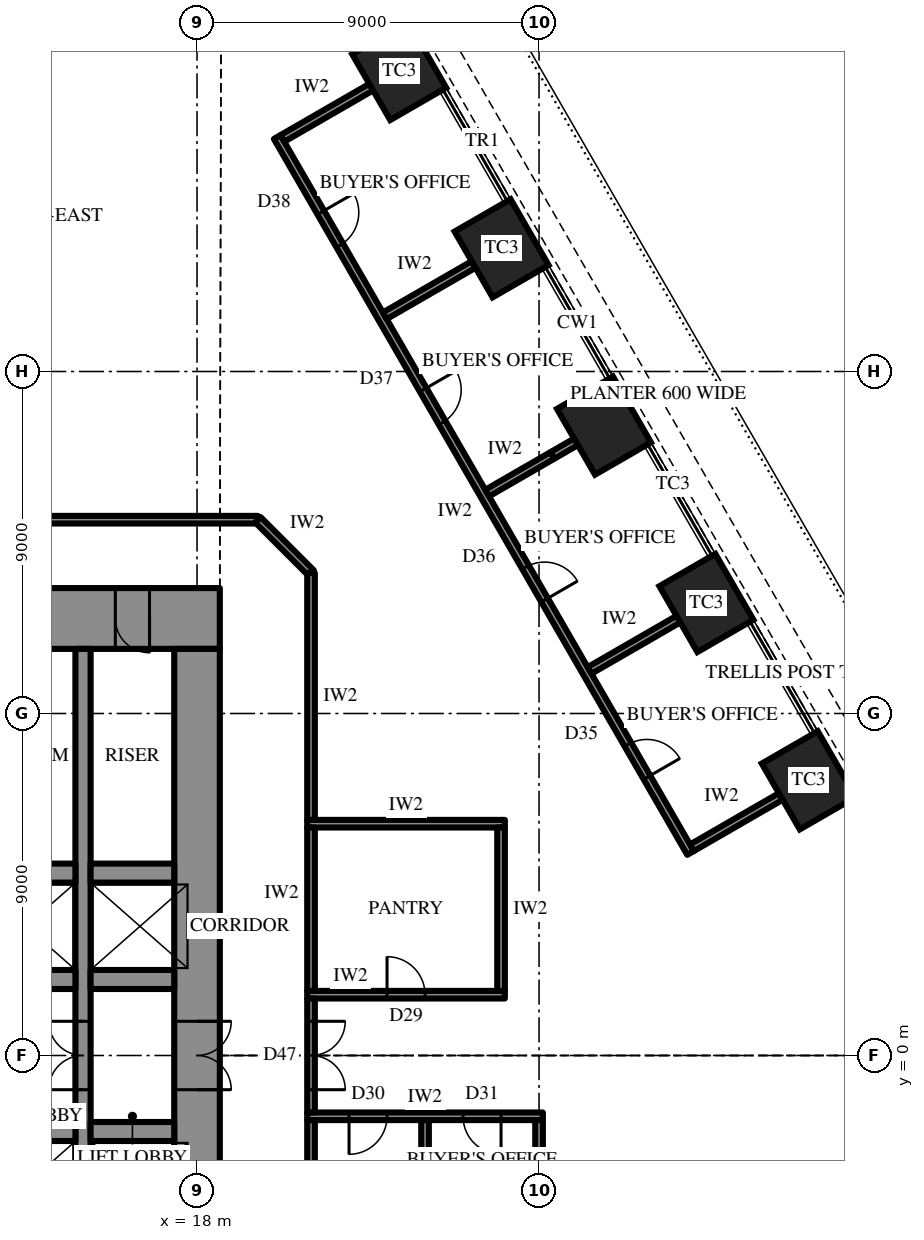
"""IFC4 building model, lengths in metres.
Left out: names, types, materials, properties, quantities, classifications, styles, units other than length and angle.
Written with IfcOpenShell. Run it as: python <this file> out.ifc"""

import sys

from ifc_helpers import new_model, si_unit, direction, frame, frame_2d, origin, origin_2d, place, context, subcontext, project, spatial, rectangle, extrude, element, fill, save


model = new_model("IFC4")
c1 = context("Model", 3, precision=1e-05, world=origin(), true_north=direction((0.0, 1.0)))
c2 = subcontext(c1, "Body", "Model", "MODEL_VIEW")
j1 = project(units=[si_unit("LENGTHUNIT", "METRE"), si_unit("PLANEANGLEUNIT", "RADIAN")], contexts=[c1])
p1 = place(None, origin())
s1 = spatial("IfcSite", under=j1, at=p1, CompositionType="ELEMENT")
p2 = place(p1, origin())
s2 = spatial("IfcBuilding", under=s1, at=p2, CompositionType="ELEMENT")
p3 = place(p2, frame((0.0, 0.0, 65.5)))
s3 = spatial("IfcBuildingStorey", under=s2, at=p3, CompositionType="ELEMENT", Elevation=65.5)
for number, where, z_axis, x_axis in (
    (1, (34.097, 7.242, 0.0), (0.0, 0.0, 1.0), (-0.5, 0.866, 0.0)),
    (2, (31.403, 11.908, 0.0), (0.0, 0.0, 1.0), (-0.5, 0.866, 0.0)),
    (3, (28.709, 16.575, 0.0), (0.0, 0.0, 1.0), (-0.5, 0.866, 0.0)),
    (4, (26.014, 21.242, 0.0), (0.0, 0.0, 1.0), (-0.5, 0.866, 0.0)),
    (5, (23.32, 25.908, 0.0), (0.0, 0.0, 1.0), (-0.5, 0.866, 0.0)),
):
    element("IfcColumn", number, at=place(p3, frame(where, z_axis=z_axis, x_axis=x_axis)), inside=s3, PredefinedType="COLUMN", context=c2, shape_type="SweptSolid", body=[
        extrude(rectangle(XDim=2.0, YDim=1.7, at=origin_2d()), origin(), (0.0, 0.0, 1.0), 4.2),
    ])
p4 = place(p3, frame((-18.6, 11.5, 0.0), z_axis=(0.0, 0.0, 1.0), x_axis=(1.0, 0.0, 0.0)))
e6 = element("IfcWall", 6, at=p4, inside=s3, PredefinedType="SHEAR", context=c2, shape_type="SweptSolid", body=[
    extrude(rectangle(XDim=37.2, YDim=1.6, at=frame_2d((18.6, 0.0))), origin(), (0.0, 0.0, 1.0), 4.2),
])
p5 = place(p4, frame((19.45, 0.0, 0.0)))
e7 = element("IfcOpeningElement", 7, at=p5, cuts=e6, PredefinedType="OPENING", context=c2, shape_type="SweptSolid", body=[
    extrude(rectangle(XDim=0.9, YDim=2.2, at=frame_2d((0.45, 1.1))), frame((0.0, 0.81, 0.0), z_axis=(0.0, -1.0, 0.0), x_axis=(1.0, 0.0, 0.0)), (0.0, 0.0, 1.0), 1.62),
])
p6 = place(p4, frame((22.45, 0.0, 0.0)))
e8 = element("IfcOpeningElement", 8, at=p6, cuts=e6, PredefinedType="OPENING", context=c2, shape_type="SweptSolid", body=[
    extrude(rectangle(XDim=0.9, YDim=2.2, at=frame_2d((0.45, 1.1))), frame((0.0, 0.81, 0.0), z_axis=(0.0, -1.0, 0.0), x_axis=(1.0, 0.0, 0.0)), (0.0, 0.0, 1.0), 1.62),
])
p7 = place(p4, frame((25.5, 0.0, 0.0)))
e9 = element("IfcOpeningElement", 9, at=p7, cuts=e6, PredefinedType="OPENING", context=c2, shape_type="SweptSolid", body=[
    extrude(rectangle(XDim=1.0, YDim=2.2, at=frame_2d((0.5, 1.1))), frame((0.0, 0.81, 0.0), z_axis=(0.0, -1.0, 0.0), x_axis=(1.0, 0.0, 0.0)), (0.0, 0.0, 1.0), 1.62),
])
p8 = place(p4, frame((1.85, 0.0, 0.0)))
e10 = element("IfcOpeningElement", 10, at=p8, cuts=e6, PredefinedType="OPENING", context=c2, shape_type="SweptSolid", body=[
    extrude(rectangle(XDim=0.9, YDim=2.2, at=frame_2d((0.45, 1.1))), frame((0.0, 0.81, 0.0), z_axis=(0.0, -1.0, 0.0), x_axis=(1.0, 0.0, 0.0)), (0.0, 0.0, 1.0), 1.62),
])
p9 = place(p4, frame((4.6, 0.0, 0.0)))
e11 = element("IfcOpeningElement", 11, at=p9, cuts=e6, PredefinedType="OPENING", context=c2, shape_type="SweptSolid", body=[
    extrude(rectangle(XDim=0.9, YDim=2.2, at=frame_2d((0.45, 1.1))), frame((0.0, 0.81, 0.0), z_axis=(0.0, -1.0, 0.0), x_axis=(1.0, 0.0, 0.0)), (0.0, 0.0, 1.0), 1.62),
])
p10 = place(p4, frame((7.75, 0.0, 0.0)))
e12 = element("IfcOpeningElement", 12, at=p10, cuts=e6, PredefinedType="OPENING", context=c2, shape_type="SweptSolid", body=[
    extrude(rectangle(XDim=0.9, YDim=2.2, at=frame_2d((0.45, 1.1))), frame((0.0, 0.81, 0.0), z_axis=(0.0, -1.0, 0.0), x_axis=(1.0, 0.0, 0.0)), (0.0, 0.0, 1.0), 1.62),
])
p11 = place(p4, frame((28.55, 0.0, 0.0)))
e13 = element("IfcOpeningElement", 13, at=p11, cuts=e6, PredefinedType="OPENING", context=c2, shape_type="SweptSolid", body=[
    extrude(rectangle(XDim=0.9, YDim=2.2, at=frame_2d((0.45, 1.1))), frame((0.0, 0.81, 0.0), z_axis=(0.0, -1.0, 0.0), x_axis=(1.0, 0.0, 0.0)), (0.0, 0.0, 1.0), 1.62),
])
p12 = place(p4, frame((31.7, 0.0, 0.0)))
e14 = element("IfcOpeningElement", 14, at=p12, cuts=e6, PredefinedType="OPENING", context=c2, shape_type="SweptSolid", body=[
    extrude(rectangle(XDim=0.9, YDim=2.2, at=frame_2d((0.45, 1.1))), frame((0.0, 0.81, 0.0), z_axis=(0.0, -1.0, 0.0), x_axis=(1.0, 0.0, 0.0)), (0.0, 0.0, 1.0), 1.62),
])
p13 = place(p4, frame((34.45, 0.0, 0.0)))
e15 = element("IfcOpeningElement", 15, at=p13, cuts=e6, PredefinedType="OPENING", context=c2, shape_type="SweptSolid", body=[
    extrude(rectangle(XDim=0.9, YDim=2.2, at=frame_2d((0.45, 1.1))), frame((0.0, 0.81, 0.0), z_axis=(0.0, -1.0, 0.0), x_axis=(1.0, 0.0, 0.0)), (0.0, 0.0, 1.0), 1.62),
])
p14 = place(p3, frame((18.0, -10.7, 0.0), z_axis=(0.0, 0.0, 1.0), x_axis=(0.0, 1.0, 0.0)))
e16 = element("IfcWall", 16, at=p14, inside=s3, PredefinedType="SHEAR", context=c2, shape_type="SweptSolid", body=[
    extrude(rectangle(XDim=21.4, YDim=1.2, at=frame_2d((10.7, 0.0))), origin(), (0.0, 0.0, 1.0), 4.2),
])
p15 = place(p14, frame((9.8, 0.0, 0.0)))
e17 = element("IfcOpeningElement", 17, at=p15, cuts=e16, PredefinedType="OPENING", context=c2, shape_type="SweptSolid", body=[
    extrude(rectangle(XDim=1.8, YDim=2.4, at=frame_2d((0.9, 1.2))), frame((0.0, 0.61, 0.0), z_axis=(0.0, -1.0, 0.0), x_axis=(1.0, 0.0, 0.0)), (0.0, 0.0, 1.0), 1.22),
])
p16 = place(p3, frame((15.0, -10.7, 0.0), z_axis=(0.0, 0.0, 1.0), x_axis=(0.0, 1.0, 0.0)))
e18 = element("IfcWall", 18, at=p16, inside=s3, PredefinedType="SHEAR", context=c2, shape_type="SweptSolid", body=[
    extrude(rectangle(XDim=21.4, YDim=0.4, at=frame_2d((10.7, 0.0))), origin(), (0.0, 0.0, 1.0), 4.2),
])
p17 = place(p16, frame((9.8, 0.0, 0.0)))
e19 = element("IfcOpeningElement", 19, at=p17, cuts=e18, PredefinedType="OPENING", context=c2, shape_type="SweptSolid", body=[
    extrude(rectangle(XDim=1.8, YDim=2.4, at=frame_2d((0.9, 1.2))), frame((0.0, 0.21, 0.0), z_axis=(0.0, -1.0, 0.0), x_axis=(1.0, 0.0, 0.0)), (0.0, 0.0, 1.0), 0.42),
])
p18 = place(p3, frame((12.3, 2.0, 0.0), z_axis=(0.0, 0.0, 1.0), x_axis=(1.0, 0.0, 0.0)))
e20 = element("IfcWall", 20, at=p18, inside=s3, PredefinedType="SHEAR", context=c2, shape_type="SweptSolid", body=[
    extrude(rectangle(XDim=2.5, YDim=0.5, at=frame_2d((1.25, 0.0))), origin(), (0.0, 0.0, 1.0), 4.2),
])
p19 = place(p3, frame((15.2, 2.0, 0.0), z_axis=(0.0, 0.0, 1.0), x_axis=(1.0, 0.0, 0.0)))
e21 = element("IfcWall", 21, at=p19, inside=s3, PredefinedType="SHEAR", context=c2, shape_type="SweptSolid", body=[
    extrude(rectangle(XDim=2.2, YDim=0.5, at=frame_2d((1.1, 0.0))), origin(), (0.0, 0.0, 1.0), 4.2),
])
p20 = place(p3, frame((12.3, 4.8, 0.0), z_axis=(0.0, 0.0, 1.0), x_axis=(1.0, 0.0, 0.0)))
e22 = element("IfcWall", 22, at=p20, inside=s3, PredefinedType="SHEAR", context=c2, shape_type="SweptSolid", body=[
    extrude(rectangle(XDim=2.5, YDim=0.5, at=frame_2d((1.25, 0.0))), origin(), (0.0, 0.0, 1.0), 4.2),
])
for number, where, z_axis, x_axis in (
    (23, (15.2, 4.8, 0.0), (0.0, 0.0, 1.0), (1.0, 0.0, 0.0)),
    (24, (17.4, -2.0, 0.0), (0.0, 0.0, 1.0), (-1.0, 0.0, 0.0)),
):
    element("IfcWall", number, at=place(p3, frame(where, z_axis=z_axis, x_axis=x_axis)), inside=s3, PredefinedType="SHEAR", context=c2, shape_type="SweptSolid", body=[
        extrude(rectangle(XDim=2.2, YDim=0.5, at=frame_2d((1.1, 0.0))), origin(), (0.0, 0.0, 1.0), 4.2),
    ])
p21 = place(p3, frame((14.8, -2.0, 0.0), z_axis=(0.0, 0.0, 1.0), x_axis=(-1.0, 0.0, 0.0)))
e25 = element("IfcWall", 25, at=p21, inside=s3, PredefinedType="SHEAR", context=c2, shape_type="SweptSolid", body=[
    extrude(rectangle(XDim=2.5, YDim=0.5, at=frame_2d((1.25, 0.0))), origin(), (0.0, 0.0, 1.0), 4.2),
])
p22 = place(p3, frame((30.986, 5.33, 0.0), z_axis=(0.0, 0.0, 1.0), x_axis=(-0.500000289772, 0.866025236485, 0.0)))
e26 = element("IfcWall", 26, at=p22, inside=s3, PredefinedType="PARTITIONING", context=c2, shape_type="SweptSolid", body=[
    extrude(rectangle(XDim=21.754, YDim=0.2, at=frame_2d((10.877, 0.0))), origin(), (0.0, 0.0, 1.0), 4.0),
])
p23 = place(p22, frame((2.294, 0.0, 0.0)))
e27 = element("IfcOpeningElement", 27, at=p23, cuts=e26, PredefinedType="OPENING", context=c2, shape_type="SweptSolid", body=[
    extrude(rectangle(XDim=1.0, YDim=2.2, at=frame_2d((0.5, 1.1))), frame((0.0, 0.11, 0.0), z_axis=(0.0, -1.0, 0.0), x_axis=(1.0, 0.0, 0.0)), (0.0, 0.0, 1.0), 0.22),
])
p24 = place(p22, frame((7.683, 0.0, 0.0)))
e28 = element("IfcOpeningElement", 28, at=p24, cuts=e26, PredefinedType="OPENING", context=c2, shape_type="SweptSolid", body=[
    extrude(rectangle(XDim=1.0, YDim=2.2, at=frame_2d((0.5, 1.1))), frame((0.0, 0.11, 0.0), z_axis=(0.0, -1.0, 0.0), x_axis=(1.0, 0.0, 0.0)), (0.0, 0.0, 1.0), 0.22),
])
p25 = place(p22, frame((13.072, 0.0, 0.0)))
e29 = element("IfcOpeningElement", 29, at=p25, cuts=e26, PredefinedType="OPENING", context=c2, shape_type="SweptSolid", body=[
    extrude(rectangle(XDim=1.0, YDim=2.2, at=frame_2d((0.5, 1.1))), frame((0.0, 0.11, 0.0), z_axis=(0.0, -1.0, 0.0), x_axis=(1.0, 0.0, 0.0)), (0.0, 0.0, 1.0), 0.22),
])
p26 = place(p22, frame((18.46, 0.0, 0.0)))
e30 = element("IfcOpeningElement", 30, at=p26, cuts=e26, PredefinedType="OPENING", context=c2, shape_type="SweptSolid", body=[
    extrude(rectangle(XDim=1.0, YDim=2.2, at=frame_2d((0.5, 1.1))), frame((0.0, 0.11, 0.0), z_axis=(0.0, -1.0, 0.0), x_axis=(1.0, 0.0, 0.0)), (0.0, 0.0, 1.0), 0.22),
])
for number, where, z_axis, x_axis in (
    (31, (31.023, 5.467, 0.0), (0.0, 0.0, 1.0), (0.866, 0.5, 0.0)),
    (32, (28.329, 10.133, 0.0), (0.0, 0.0, 1.0), (0.866, 0.5, 0.0)),
):
    element("IfcWall", number, at=place(p3, frame(where, z_axis=z_axis, x_axis=x_axis)), inside=s3, PredefinedType="PARTITIONING", context=c2, shape_type="SweptSolid", body=[
        extrude(rectangle(XDim=2.7, YDim=0.2, at=frame_2d((1.35, 0.0))), origin(), (0.0, 0.0, 1.0), 2.944),
    ])
p27 = place(p3, frame((25.634, 14.8, 0.0), z_axis=(0.0, 0.0, 1.0), x_axis=(0.866038008192, 0.49997816789, 0.0)))
e33 = element("IfcWall", 33, at=p27, inside=s3, PredefinedType="PARTITIONING", context=c2, shape_type="SweptSolid", body=[
    extrude(rectangle(XDim=1.983, YDim=0.2, at=frame_2d((0.992, 0.0))), origin(), (0.0, 0.0, 1.0), 4.0),
])
p28 = place(p3, frame((27.352, 15.792, 0.0), z_axis=(0.0, 0.0, 1.0), x_axis=(0.866117509073, 0.499840435016, 0.0)))
e34 = element("IfcWall", 34, at=p28, inside=s3, PredefinedType="PARTITIONING", context=c2, shape_type="SweptSolid", body=[
    extrude(rectangle(XDim=0.717, YDim=0.2, at=frame_2d((0.358, 0.0))), origin(), (0.0, 0.0, 1.0), 2.992),
])
p29 = place(p3, frame((22.94, 19.467, 0.0), z_axis=(0.0, 0.0, 1.0), x_axis=(0.866019956843, 0.50000943426, 0.0)))
e35 = element("IfcWall", 35, at=p29, inside=s3, PredefinedType="PARTITIONING", context=c2, shape_type="SweptSolid", body=[
    extrude(rectangle(XDim=2.7, YDim=0.2, at=frame_2d((1.35, 0.0))), origin(), (0.0, 0.0, 1.0), 2.992),
])
p30 = place(p3, frame((20.246, 24.133, 0.0), z_axis=(0.0, 0.0, 1.0), x_axis=(0.86599734893, 0.500048589285, 0.0)))
e36 = element("IfcWall", 36, at=p30, inside=s3, PredefinedType="PARTITIONING", context=c2, shape_type="SweptSolid", body=[
    extrude(rectangle(XDim=2.7, YDim=0.2, at=frame_2d((1.35, 0.0))), origin(), (0.0, 0.0, 1.0), 2.992),
])
p31 = place(p3, frame((20.9, 1.6, 0.0), z_axis=(0.0, 0.0, 1.0), x_axis=(1.0, 0.0, 0.0)))
e37 = element("IfcWall", 37, at=p31, inside=s3, PredefinedType="PARTITIONING", context=c2, shape_type="SweptSolid", body=[
    extrude(rectangle(XDim=5.2, YDim=0.2, at=frame_2d((2.6, 0.0))), origin(), (0.0, 0.0, 1.0), 4.0),
])
p32 = place(p31, frame((2.1, 0.0, 0.0)))
e38 = element("IfcOpeningElement", 38, at=p32, cuts=e37, PredefinedType="OPENING", context=c2, shape_type="SweptSolid", body=[
    extrude(rectangle(XDim=1.0, YDim=2.2, at=frame_2d((0.5, 1.1))), frame((0.0, 0.11, 0.0), z_axis=(0.0, -1.0, 0.0), x_axis=(1.0, 0.0, 0.0)), (0.0, 0.0, 1.0), 0.22),
])
p33 = place(p3, frame((20.9, 6.1, 0.0), z_axis=(0.0, 0.0, 1.0), x_axis=(1.0, 0.0, 0.0)))
e39 = element("IfcWall", 39, at=p33, inside=s3, PredefinedType="PARTITIONING", context=c2, shape_type="SweptSolid", body=[
    extrude(rectangle(XDim=5.2, YDim=0.2, at=frame_2d((2.6, 0.0))), origin(), (0.0, 0.0, 1.0), 4.0),
])
for number, where, z_axis, x_axis in (
    (40, (21.0, 1.7, 0.0), (0.0, 0.0, 1.0), (0.0, 1.0, 0.0)),
    (41, (26.0, 1.7, 0.0), (0.0, 0.0, 1.0), (0.0, 1.0, 0.0)),
):
    element("IfcWall", number, at=place(p3, frame(where, z_axis=z_axis, x_axis=x_axis)), inside=s3, PredefinedType="PARTITIONING", context=c2, shape_type="SweptSolid", body=[
        extrude(rectangle(XDim=4.3, YDim=0.2, at=frame_2d((2.15, 0.0))), origin(), (0.0, 0.0, 1.0), 4.0),
    ])
p34 = place(p3, frame((20.9, -1.6, 0.0), z_axis=(0.0, 0.0, 1.0), x_axis=(1.0, 0.0, 0.0)))
e42 = element("IfcWall", 42, at=p34, inside=s3, PredefinedType="PARTITIONING", context=c2, shape_type="SweptSolid", body=[
    extrude(rectangle(XDim=6.2, YDim=0.2, at=frame_2d((3.1, 0.0))), origin(), (0.0, 0.0, 1.0), 4.0),
])
p35 = place(p34, frame((1.1, 0.0, 0.0)))
e43 = element("IfcOpeningElement", 43, at=p35, cuts=e42, PredefinedType="OPENING", context=c2, shape_type="SweptSolid", body=[
    extrude(rectangle(XDim=1.0, YDim=2.2, at=frame_2d((0.5, 1.1))), frame((0.0, 0.11, 0.0), z_axis=(0.0, -1.0, 0.0), x_axis=(1.0, 0.0, 0.0)), (0.0, 0.0, 1.0), 0.22),
])
p36 = place(p34, frame((4.1, 0.0, 0.0)))
e44 = element("IfcOpeningElement", 44, at=p36, cuts=e42, PredefinedType="OPENING", context=c2, shape_type="SweptSolid", body=[
    extrude(rectangle(XDim=1.0, YDim=2.2, at=frame_2d((0.5, 1.1))), frame((0.0, 0.11, 0.0), z_axis=(0.0, -1.0, 0.0), x_axis=(1.0, 0.0, 0.0)), (0.0, 0.0, 1.0), 0.22),
])
for number, where, z_axis, x_axis in (
    (45, (21.0, -1.7, 0.0), (0.0, 0.0, 1.0), (0.0, -1.0, 0.0)),
    (46, (24.0, -1.7, 0.0), (0.0, 0.0, 1.0), (0.0, -1.0, 0.0)),
    (47, (27.0, -1.7, 0.0), (0.0, 0.0, 1.0), (0.0, -1.0, 0.0)),
):
    element("IfcWall", number, at=place(p3, frame(where, z_axis=z_axis, x_axis=x_axis)), inside=s3, PredefinedType="PARTITIONING", context=c2, shape_type="SweptSolid", body=[
        extrude(rectangle(XDim=4.3, YDim=0.2, at=frame_2d((2.15, 0.0))), origin(), (0.0, 0.0, 1.0), 4.0),
    ])
p37 = place(p3, frame((-19.6, 14.1, 0.0), z_axis=(0.0, 0.0, 1.0), x_axis=(1.0, 0.0, 0.0)))
e48 = element("IfcWall", 48, at=p37, inside=s3, PredefinedType="PARTITIONING", context=c2, shape_type="SweptSolid", body=[
    extrude(rectangle(XDim=39.2, YDim=0.2, at=frame_2d((19.6, 0.0))), origin(), (0.0, 0.0, 1.0), 4.0),
])
p38 = place(p37, frame((19.1, 0.0, 0.0)))
e49 = element("IfcOpeningElement", 49, at=p38, cuts=e48, PredefinedType="OPENING", context=c2, shape_type="SweptSolid", body=[
    extrude(rectangle(XDim=1.0, YDim=2.2, at=frame_2d((0.5, 1.1))), frame((0.0, 0.11, 0.0), z_axis=(0.0, -1.0, 0.0), x_axis=(1.0, 0.0, 0.0)), (0.0, 0.0, 1.0), 0.22),
])
p39 = place(p3, frame((19.6, 14.1, 0.0), z_axis=(0.0, 0.0, 1.0), x_axis=(0.707045124756, -0.707168432242, 0.0)))
e50 = element("IfcWall", 50, at=p39, inside=s3, PredefinedType="PARTITIONING", context=c2, shape_type="SweptSolid", body=[
    extrude(rectangle(XDim=1.98, YDim=0.2, at=frame_2d((0.99, 0.0))), origin(), (0.0, 0.0, 1.0), 4.0),
])
p40 = place(p3, frame((21.0, 1.499, 0.0), z_axis=(0.0, 0.0, 1.0), x_axis=(0.0, -1.0, 0.0)))
e51 = element("IfcWall", 51, at=p40, inside=s3, PredefinedType="PARTITIONING", context=c2, shape_type="SweptSolid", body=[
    extrude(rectangle(XDim=2.998, YDim=0.2, at=frame_2d((1.499, 0.0))), origin(), (0.0, 0.0, 1.0), 4.0),
])
p41 = place(p40, frame((0.599, 0.0, 0.0)))
e52 = element("IfcOpeningElement", 52, at=p41, cuts=e51, PredefinedType="OPENING", context=c2, shape_type="SweptSolid", body=[
    extrude(rectangle(XDim=1.8, YDim=2.4, at=frame_2d((0.9, 1.2))), frame((0.0, 0.11, 0.0), z_axis=(0.0, -1.0, 0.0), x_axis=(1.0, 0.0, 0.0)), (0.0, 0.0, 1.0), 0.22),
])
p42 = place(p3, frame((21.0, 12.7, 0.0), z_axis=(0.0, 0.0, 1.0), x_axis=(0.0, -1.0, 0.0)))
e53 = element("IfcWall", 53, at=p42, inside=s3, PredefinedType="PARTITIONING", context=c2, shape_type="SweptSolid", body=[
    extrude(rectangle(XDim=6.499, YDim=0.2, at=frame_2d((3.25, 0.0))), origin(), (0.0, 0.0, 1.0), 4.0),
])
p43 = place(p15, frame((1.8, 0.0, 0.0), z_axis=(0.0, 0.0, 1.0), x_axis=(-1.0, 0.0, 0.0)))
e54 = element("IfcDoor", 54, at=p43, inside=s3, OperationType="DOUBLE_DOOR_SINGLE_SWING", PredefinedType="DOOR", context=c2, shape_type="SweptSolid", body=[
    extrude(rectangle(XDim=1.8, YDim=2.4, at=frame_2d((0.9, 1.2))), frame((0.0, 0.025, 0.0), z_axis=(0.0, -1.0, 0.0), x_axis=(1.0, 0.0, 0.0)), (0.0, 0.0, 1.0), 0.05),
])
fill(e17, e54)
p44 = place(p13, frame((0.9, 0.0, 0.0), z_axis=(0.0, 0.0, 1.0), x_axis=(-1.0, 0.0, 0.0)))
e55 = element("IfcDoor", 55, at=p44, inside=s3, OperationType="SINGLE_SWING_RIGHT", PredefinedType="DOOR", context=c2, shape_type="SweptSolid", body=[
    extrude(rectangle(XDim=0.9, YDim=2.2, at=frame_2d((0.45, 1.1))), frame((0.0, 0.025, 0.0), z_axis=(0.0, -1.0, 0.0), x_axis=(1.0, 0.0, 0.0)), (0.0, 0.0, 1.0), 0.05),
])
fill(e15, e55)
p45 = place(p17, origin())
e56 = element("IfcDoor", 56, at=p45, inside=s3, OperationType="DOUBLE_DOOR_SINGLE_SWING", PredefinedType="DOOR", context=c2, shape_type="SweptSolid", body=[
    extrude(rectangle(XDim=1.8, YDim=2.4, at=frame_2d((0.9, 1.2))), frame((0.0, 0.025, 0.0), z_axis=(0.0, -1.0, 0.0), x_axis=(1.0, 0.0, 0.0)), (0.0, 0.0, 1.0), 0.05),
])
fill(e19, e56)
p46 = place(p23, frame((1.0, 0.0, 0.0), z_axis=(0.0, 0.0, 1.0), x_axis=(-1.0, 0.0, 0.0)))
e57 = element("IfcDoor", 57, at=p46, inside=s3, OperationType="SINGLE_SWING_LEFT", PredefinedType="DOOR", context=c2, shape_type="SweptSolid", body=[
    extrude(rectangle(XDim=1.0, YDim=2.2, at=frame_2d((0.5, 1.1))), frame((0.0, 0.025, 0.0), z_axis=(0.0, -1.0, 0.0), x_axis=(1.0, 0.0, 0.0)), (0.0, 0.0, 1.0), 0.05),
])
fill(e27, e57)
p47 = place(p24, frame((1.0, 0.0, 0.0), z_axis=(0.0, 0.0, 1.0), x_axis=(-1.0, 0.0, 0.0)))
e58 = element("IfcDoor", 58, at=p47, inside=s3, OperationType="SINGLE_SWING_LEFT", PredefinedType="DOOR", context=c2, shape_type="SweptSolid", body=[
    extrude(rectangle(XDim=1.0, YDim=2.2, at=frame_2d((0.5, 1.1))), frame((0.0, 0.025, 0.0), z_axis=(0.0, -1.0, 0.0), x_axis=(1.0, 0.0, 0.0)), (0.0, 0.0, 1.0), 0.05),
])
fill(e28, e58)
p48 = place(p25, frame((1.0, 0.0, 0.0), z_axis=(0.0, 0.0, 1.0), x_axis=(-1.0, 0.0, 0.0)))
e59 = element("IfcDoor", 59, at=p48, inside=s3, OperationType="SINGLE_SWING_RIGHT", PredefinedType="DOOR", context=c2, shape_type="SweptSolid", body=[
    extrude(rectangle(XDim=1.0, YDim=2.2, at=frame_2d((0.5, 1.1))), frame((0.0, 0.025, 0.0), z_axis=(0.0, -1.0, 0.0), x_axis=(1.0, 0.0, 0.0)), (0.0, 0.0, 1.0), 0.05),
])
fill(e29, e59)
p49 = place(p26, frame((1.0, 0.0, 0.0), z_axis=(0.0, 0.0, 1.0), x_axis=(-1.0, 0.0, 0.0)))
e60 = element("IfcDoor", 60, at=p49, inside=s3, OperationType="SINGLE_SWING_RIGHT", PredefinedType="DOOR", context=c2, shape_type="SweptSolid", body=[
    extrude(rectangle(XDim=1.0, YDim=2.2, at=frame_2d((0.5, 1.1))), frame((0.0, 0.025, 0.0), z_axis=(0.0, -1.0, 0.0), x_axis=(1.0, 0.0, 0.0)), (0.0, 0.0, 1.0), 0.05),
])
fill(e30, e60)
p50 = place(p32, origin())
e61 = element("IfcDoor", 61, at=p50, inside=s3, OperationType="SINGLE_SWING_RIGHT", PredefinedType="DOOR", context=c2, shape_type="SweptSolid", body=[
    extrude(rectangle(XDim=1.0, YDim=2.2, at=frame_2d((0.5, 1.1))), frame((0.0, 0.025, 0.0), z_axis=(0.0, -1.0, 0.0), x_axis=(1.0, 0.0, 0.0)), (0.0, 0.0, 1.0), 0.05),
])
fill(e38, e61)
p51 = place(p35, frame((1.0, 0.0, 0.0), z_axis=(0.0, 0.0, 1.0), x_axis=(-1.0, 0.0, 0.0)))
e62 = element("IfcDoor", 62, at=p51, inside=s3, OperationType="SINGLE_SWING_LEFT", PredefinedType="DOOR", context=c2, shape_type="SweptSolid", body=[
    extrude(rectangle(XDim=1.0, YDim=2.2, at=frame_2d((0.5, 1.1))), frame((0.0, 0.025, 0.0), z_axis=(0.0, -1.0, 0.0), x_axis=(1.0, 0.0, 0.0)), (0.0, 0.0, 1.0), 0.05),
])
fill(e43, e62)
p52 = place(p36, frame((1.0, 0.0, 0.0), z_axis=(0.0, 0.0, 1.0), x_axis=(-1.0, 0.0, 0.0)))
e63 = element("IfcDoor", 63, at=p52, inside=s3, OperationType="SINGLE_SWING_RIGHT", PredefinedType="DOOR", context=c2, shape_type="SweptSolid", body=[
    extrude(rectangle(XDim=1.0, YDim=2.2, at=frame_2d((0.5, 1.1))), frame((0.0, 0.025, 0.0), z_axis=(0.0, -1.0, 0.0), x_axis=(1.0, 0.0, 0.0)), (0.0, 0.0, 1.0), 0.05),
])
fill(e44, e63)
p53 = place(p41, origin())
e64 = element("IfcDoor", 64, at=p53, inside=s3, OperationType="DOUBLE_DOOR_SINGLE_SWING", PredefinedType="DOOR", context=c2, shape_type="SweptSolid", body=[
    extrude(rectangle(XDim=1.8, YDim=2.4, at=frame_2d((0.9, 1.2))), frame((0.0, 0.025, 0.0), z_axis=(0.0, -1.0, 0.0), x_axis=(1.0, 0.0, 0.0)), (0.0, 0.0, 1.0), 0.05),
])
fill(e52, e64)
save(model, sys.argv[1])
